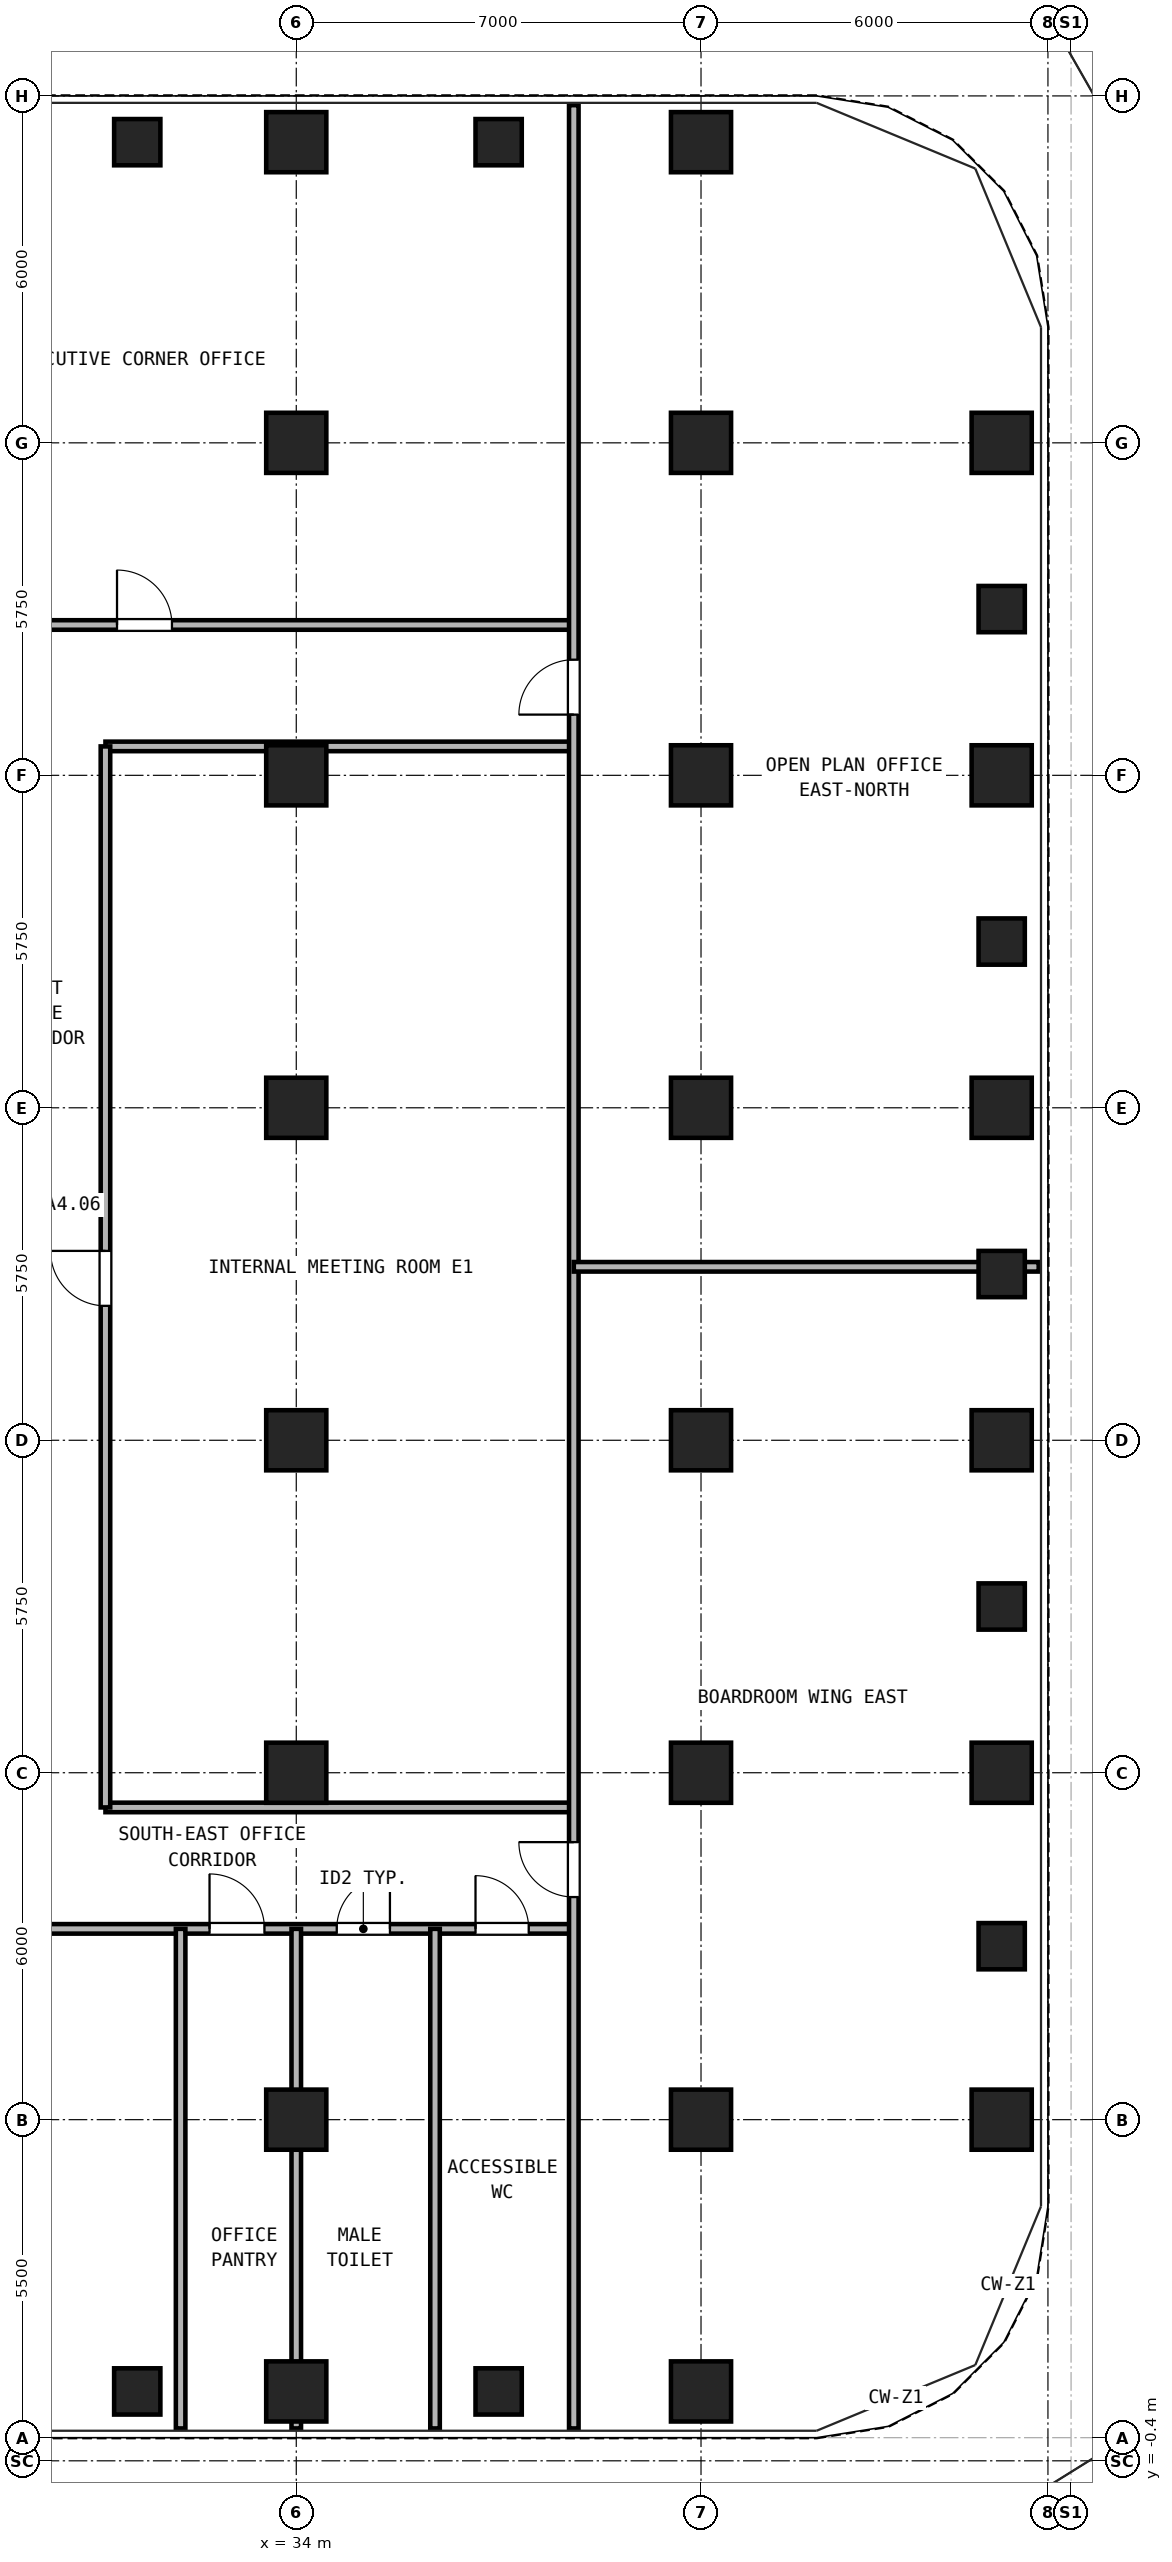
"""IFC4 building model, lengths in metres.
Left out: names, types, materials, properties, quantities, classifications, styles, units other than length and angle.
Written with IfcOpenShell. Run it as: python <this file> out.ifc"""

import sys

from ifc_helpers import new_model, si_unit, direction, frame, frame_2d, origin, origin_2d, place, context, subcontext, project, spatial, rectangle, hollow_rectangle, extrude, source, transform, mapped, element, fill, save


model = new_model("IFC4")
c1 = context("Model", 3, precision=1e-05, world=origin(), true_north=direction((0.0, 1.0)))
c2 = subcontext(c1, "Body", "Model", "MODEL_VIEW")
j1 = project(units=[si_unit("LENGTHUNIT", "METRE"), si_unit("PLANEANGLEUNIT", "RADIAN")], contexts=[c1])
p1 = place(None, origin())
s1 = spatial("IfcSite", under=j1, at=p1, CompositionType="ELEMENT")
p2 = place(p1, origin())
s2 = spatial("IfcBuilding", under=s1, at=p2, CompositionType="ELEMENT")
p3 = place(p2, frame((0.0, 0.0, 26.1)))
s3 = spatial("IfcBuildingStorey", under=s2, at=p3, CompositionType="ELEMENT", Elevation=26.1)
m1 = source(origin(), c2, "Body", "SweptSolid", [
    extrude(hollow_rectangle(XDim=1.04, YDim=1.04, WallThickness=0.065, at=origin_2d()), origin(), (0.0, 0.0, 1.0), 3.32),
])
for number, where, z_axis, x_axis in (
    (1, (34.0, 0.8, 0.0), (0.0, 0.0, 1.0), (1.0, 0.0, 0.0)),
    (2, (34.0, 39.7, 0.0), (0.0, 0.0, 1.0), (1.0, 0.0, 0.0)),
    (3, (41.0, 0.8, 0.0), (0.0, 0.0, 1.0), (1.0, 0.0, 0.0)),
    (4, (41.0, 39.7, 0.0), (0.0, 0.0, 1.0), (1.0, 0.0, 0.0)),
    (5, (46.2, 5.5, 0.0), (0.0, 0.0, 1.0), (1.0, 0.0, 0.0)),
    (6, (46.2, 11.5, 0.0), (0.0, 0.0, 1.0), (1.0, 0.0, 0.0)),
    (7, (46.2, 17.25, 0.0), (0.0, 0.0, 1.0), (1.0, 0.0, 0.0)),
    (8, (46.2, 23.0, 0.0), (0.0, 0.0, 1.0), (1.0, 0.0, 0.0)),
    (9, (46.2, 28.75, 0.0), (0.0, 0.0, 1.0), (1.0, 0.0, 0.0)),
    (10, (46.2, 34.5, 0.0), (0.0, 0.0, 1.0), (1.0, 0.0, 0.0)),
    (11, (34.0, 5.5, 0.0), (0.0, 0.0, 1.0), (1.0, 0.0, 0.0)),
    (12, (34.0, 11.5, 0.0), (0.0, 0.0, 1.0), (1.0, 0.0, 0.0)),
    (13, (34.0, 17.25, 0.0), (0.0, 0.0, 1.0), (1.0, 0.0, 0.0)),
    (14, (34.0, 23.0, 0.0), (0.0, 0.0, 1.0), (1.0, 0.0, 0.0)),
    (15, (34.0, 28.75, 0.0), (0.0, 0.0, 1.0), (1.0, 0.0, 0.0)),
    (16, (34.0, 34.5, 0.0), (0.0, 0.0, 1.0), (1.0, 0.0, 0.0)),
    (17, (41.0, 5.5, 0.0), (0.0, 0.0, 1.0), (1.0, 0.0, 0.0)),
    (18, (41.0, 11.5, 0.0), (0.0, 0.0, 1.0), (1.0, 0.0, 0.0)),
    (19, (41.0, 17.25, 0.0), (0.0, 0.0, 1.0), (1.0, 0.0, 0.0)),
    (20, (41.0, 23.0, 0.0), (0.0, 0.0, 1.0), (1.0, 0.0, 0.0)),
    (21, (41.0, 28.75, 0.0), (0.0, 0.0, 1.0), (1.0, 0.0, 0.0)),
    (22, (41.0, 34.5, 0.0), (0.0, 0.0, 1.0), (1.0, 0.0, 0.0)),
):
    element("IfcColumn", number, at=place(p3, frame(where, z_axis=z_axis, x_axis=x_axis)), inside=s3, PredefinedType="COLUMN", context=c2, shape_type="MappedRepresentation", body=[
        mapped(m1, transform((0.0, 0.0, 0.0), x_axis=(1.0, 0.0, 0.0), y_axis=(0.0, 1.0, 0.0), z_axis=(0.0, 0.0, 1.0), scale=1.0)),
    ])
m2 = source(origin(), c2, "Body", "SweptSolid", [
    extrude(hollow_rectangle(XDim=0.8, YDim=0.8, WallThickness=0.045, at=origin_2d()), origin(), (0.0, 0.0, 1.0), 3.32),
])
for number, where, z_axis, x_axis in (
    (23, (31.25, 0.8, 0.0), (0.0, 0.0, 1.0), (1.0, 0.0, 0.0)),
    (24, (31.25, 39.7, 0.0), (0.0, 0.0, 1.0), (1.0, 0.0, 0.0)),
    (25, (37.5, 0.8, 0.0), (0.0, 0.0, 1.0), (1.0, 0.0, 0.0)),
    (26, (37.5, 39.7, 0.0), (0.0, 0.0, 1.0), (1.0, 0.0, 0.0)),
    (27, (46.2, 8.5, 0.0), (0.0, 0.0, 1.0), (1.0, 0.0, 0.0)),
    (28, (46.2, 14.375, 0.0), (0.0, 0.0, 1.0), (1.0, 0.0, 0.0)),
    (29, (46.2, 20.125, 0.0), (0.0, 0.0, 1.0), (1.0, 0.0, 0.0)),
    (30, (46.2, 25.875, 0.0), (0.0, 0.0, 1.0), (1.0, 0.0, 0.0)),
    (31, (46.2, 31.625, 0.0), (0.0, 0.0, 1.0), (1.0, 0.0, 0.0)),
):
    element("IfcColumn", number, at=place(p3, frame(where, z_axis=z_axis, x_axis=x_axis)), inside=s3, PredefinedType="COLUMN", context=c2, shape_type="MappedRepresentation", body=[
        mapped(m2, transform((0.0, 0.0, 0.0), x_axis=(1.0, 0.0, 0.0), y_axis=(0.0, 1.0, 0.0), z_axis=(0.0, 0.0, 1.0), scale=1.0)),
    ])
p4 = place(p3, frame((8.2, 8.8, 0.0), z_axis=(0.0, 0.0, 1.0), x_axis=(1.0, 0.0, 0.0)))
e32 = element("IfcWall", 32, at=p4, inside=s3, PredefinedType="PARTITIONING", context=c2, shape_type="SweptSolid", body=[
    extrude(rectangle(XDim=30.6, YDim=0.165, at=frame_2d((15.3, 0.0))), origin(), (0.0, 0.0, 1.0), 3.32),
])
p5 = place(p4, frame((7.15, 0.0, 0.0)))
e33 = element("IfcOpeningElement", 33, at=p5, cuts=e32, PredefinedType="OPENING", context=c2, shape_type="SweptSolid", body=[
    extrude(rectangle(XDim=0.95, YDim=2.15, at=frame_2d((0.475, 1.075))), frame((0.0, 0.093, 0.0), z_axis=(0.0, -1.0, 0.0), x_axis=(1.0, 0.0, 0.0)), (0.0, 0.0, 1.0), 0.185),
])
p6 = place(p4, frame((19.05, 0.0, 0.0)))
e34 = element("IfcOpeningElement", 34, at=p6, cuts=e32, PredefinedType="OPENING", context=c2, shape_type="SweptSolid", body=[
    extrude(rectangle(XDim=0.95, YDim=2.15, at=frame_2d((0.475, 1.075))), frame((0.0, 0.093, 0.0), z_axis=(0.0, -1.0, 0.0), x_axis=(1.0, 0.0, 0.0)), (0.0, 0.0, 1.0), 0.185),
])
p7 = place(p4, frame((24.3, 0.0, 0.0)))
e35 = element("IfcOpeningElement", 35, at=p7, cuts=e32, PredefinedType="OPENING", context=c2, shape_type="SweptSolid", body=[
    extrude(rectangle(XDim=0.95, YDim=2.15, at=frame_2d((0.475, 1.075))), frame((0.0, 0.093, 0.0), z_axis=(0.0, -1.0, 0.0), x_axis=(1.0, 0.0, 0.0)), (0.0, 0.0, 1.0), 0.185),
])
p8 = place(p4, frame((26.5, 0.0, 0.0)))
e36 = element("IfcOpeningElement", 36, at=p8, cuts=e32, PredefinedType="OPENING", context=c2, shape_type="SweptSolid", body=[
    extrude(rectangle(XDim=0.92, YDim=2.1, at=frame_2d((0.46, 1.05))), frame((0.0, 0.093, 0.0), z_axis=(0.0, -1.0, 0.0), x_axis=(1.0, 0.0, 0.0)), (0.0, 0.0, 1.0), 0.185),
])
p9 = place(p4, frame((28.9, 0.0, 0.0)))
e37 = element("IfcOpeningElement", 37, at=p9, cuts=e32, PredefinedType="OPENING", context=c2, shape_type="SweptSolid", body=[
    extrude(rectangle(XDim=0.92, YDim=2.1, at=frame_2d((0.46, 1.05))), frame((0.0, 0.093, 0.0), z_axis=(0.0, -1.0, 0.0), x_axis=(1.0, 0.0, 0.0)), (0.0, 0.0, 1.0), 0.185),
])
p10 = place(p3, frame((8.2, 31.35, 0.0), z_axis=(0.0, 0.0, 1.0), x_axis=(1.0, 0.0, 0.0)))
e38 = element("IfcWall", 38, at=p10, inside=s3, PredefinedType="PARTITIONING", context=c2, shape_type="SweptSolid", body=[
    extrude(rectangle(XDim=30.6, YDim=0.165, at=frame_2d((15.3, 0.0))), origin(), (0.0, 0.0, 1.0), 3.32),
])
p11 = place(p10, frame((7.4, 0.0, 0.0)))
e39 = element("IfcOpeningElement", 39, at=p11, cuts=e38, PredefinedType="OPENING", context=c2, shape_type="SweptSolid", body=[
    extrude(rectangle(XDim=0.95, YDim=2.15, at=frame_2d((0.475, 1.075))), frame((0.0, 0.093, 0.0), z_axis=(0.0, -1.0, 0.0), x_axis=(1.0, 0.0, 0.0)), (0.0, 0.0, 1.0), 0.185),
])
p12 = place(p10, frame((22.7, 0.0, 0.0)))
e40 = element("IfcOpeningElement", 40, at=p12, cuts=e38, PredefinedType="OPENING", context=c2, shape_type="SweptSolid", body=[
    extrude(rectangle(XDim=0.95, YDim=2.15, at=frame_2d((0.475, 1.075))), frame((0.0, 0.093, 0.0), z_axis=(0.0, -1.0, 0.0), x_axis=(1.0, 0.0, 0.0)), (0.0, 0.0, 1.0), 0.185),
])
for number, where, z_axis, x_axis in (
    (41, (30.7, 10.9, 0.0), (0.0, 0.0, 1.0), (1.0, 0.0, 0.0)),
    (42, (30.7, 29.25, 0.0), (0.0, 0.0, 1.0), (1.0, 0.0, 0.0)),
):
    element("IfcWall", number, at=place(p3, frame(where, z_axis=z_axis, x_axis=x_axis)), inside=s3, PredefinedType="PARTITIONING", context=c2, shape_type="SweptSolid", body=[
        extrude(rectangle(XDim=8.1, YDim=0.165, at=frame_2d((4.05, 0.0))), origin(), (0.0, 0.0, 1.0), 3.32),
    ])
p13 = place(p3, frame((30.7, 10.9, 0.0), z_axis=(0.0, 0.0, 1.0), x_axis=(0.0, 1.0, 0.0)))
e43 = element("IfcWall", 43, at=p13, inside=s3, PredefinedType="PARTITIONING", context=c2, shape_type="SweptSolid", body=[
    extrude(rectangle(XDim=18.35, YDim=0.165, at=frame_2d((9.175, 0.0))), origin(), (0.0, 0.0, 1.0), 3.32),
])
p14 = place(p13, frame((8.675, 0.0, 0.0)))
e44 = element("IfcOpeningElement", 44, at=p14, cuts=e43, PredefinedType="OPENING", context=c2, shape_type="SweptSolid", body=[
    extrude(rectangle(XDim=0.95, YDim=2.15, at=frame_2d((0.475, 1.075))), frame((0.0, 0.093, 0.0), z_axis=(0.0, -1.0, 0.0), x_axis=(1.0, 0.0, 0.0)), (0.0, 0.0, 1.0), 0.185),
])
p15 = place(p3, frame((38.8, 0.16, 0.0), z_axis=(0.0, 0.0, 1.0), x_axis=(0.0, 1.0, 0.0)))
e45 = element("IfcWall", 45, at=p15, inside=s3, PredefinedType="PARTITIONING", context=c2, shape_type="SweptSolid", body=[
    extrude(rectangle(XDim=40.18, YDim=0.165, at=frame_2d((20.09, 0.0))), origin(), (0.0, 0.0, 1.0), 3.32),
])
p16 = place(p15, frame((9.19, 0.0, 0.0)))
e46 = element("IfcOpeningElement", 46, at=p16, cuts=e45, PredefinedType="OPENING", context=c2, shape_type="SweptSolid", body=[
    extrude(rectangle(XDim=0.95, YDim=2.15, at=frame_2d((0.475, 1.075))), frame((0.0, 0.093, 0.0), z_axis=(0.0, -1.0, 0.0), x_axis=(1.0, 0.0, 0.0)), (0.0, 0.0, 1.0), 0.185),
])
p17 = place(p15, frame((29.64, 0.0, 0.0)))
e47 = element("IfcOpeningElement", 47, at=p17, cuts=e45, PredefinedType="OPENING", context=c2, shape_type="SweptSolid", body=[
    extrude(rectangle(XDim=0.95, YDim=2.15, at=frame_2d((0.475, 1.075))), frame((0.0, 0.093, 0.0), z_axis=(0.0, -1.0, 0.0), x_axis=(1.0, 0.0, 0.0)), (0.0, 0.0, 1.0), 0.185),
])
p18 = place(p3, frame((32.0, 0.16, 0.0), z_axis=(0.0, 0.0, 1.0), x_axis=(0.0, 1.0, 0.0)))
e48 = element("IfcWall", 48, at=p18, inside=s3, PredefinedType="PARTITIONING", context=c2, shape_type="SweptSolid", body=[
    extrude(rectangle(XDim=8.64, YDim=0.165, at=frame_2d((4.32, 0.0))), origin(), (0.0, 0.0, 1.0), 3.32),
])
p19 = place(p3, frame((34.0, 0.16, 0.0), z_axis=(0.0, 0.0, 1.0), x_axis=(0.0, 1.0, 0.0)))
e49 = element("IfcWall", 49, at=p19, inside=s3, PredefinedType="PARTITIONING", context=c2, shape_type="SweptSolid", body=[
    extrude(rectangle(XDim=8.64, YDim=0.165, at=frame_2d((4.32, 0.0))), origin(), (0.0, 0.0, 1.0), 2.539),
])
p20 = place(p3, frame((36.4, 0.16, 0.0), z_axis=(0.0, 0.0, 1.0), x_axis=(0.0, 1.0, 0.0)))
e50 = element("IfcWall", 50, at=p20, inside=s3, PredefinedType="PARTITIONING", context=c2, shape_type="SweptSolid", body=[
    extrude(rectangle(XDim=8.64, YDim=0.165, at=frame_2d((4.32, 0.0))), origin(), (0.0, 0.0, 1.0), 3.32),
])
p21 = place(p3, frame((38.8, 20.25, 0.0), z_axis=(0.0, 0.0, 1.0), x_axis=(1.0, 0.0, 0.0)))
e51 = element("IfcWall", 51, at=p21, inside=s3, PredefinedType="PARTITIONING", context=c2, shape_type="SweptSolid", body=[
    extrude(rectangle(XDim=8.04, YDim=0.165, at=frame_2d((4.02, 0.0))), origin(), (0.0, 0.0, 1.0), 2.898),
])
p22 = place(p7, frame((0.95, 0.0, 0.0), z_axis=(0.0, 0.0, 1.0), x_axis=(-1.0, 0.0, 0.0)))
e52 = element("IfcDoor", 52, at=p22, inside=s3, OperationType="SINGLE_SWING_LEFT", PredefinedType="DOOR", context=c2, shape_type="SweptSolid", body=[
    extrude(rectangle(XDim=0.95, YDim=2.15, at=frame_2d((0.475, 1.075))), frame((0.0, 0.025, 0.0), z_axis=(0.0, -1.0, 0.0), x_axis=(1.0, 0.0, 0.0)), (0.0, 0.0, 1.0), 0.05),
])
fill(e35, e52)
p23 = place(p8, frame((0.92, 0.0, 0.0), z_axis=(0.0, 0.0, 1.0), x_axis=(-1.0, 0.0, 0.0)))
e53 = element("IfcDoor", 53, at=p23, inside=s3, OperationType="SINGLE_SWING_RIGHT", PredefinedType="DOOR", context=c2, shape_type="SweptSolid", body=[
    extrude(rectangle(XDim=0.92, YDim=2.1, at=frame_2d((0.46, 1.05))), frame((0.0, 0.025, 0.0), z_axis=(0.0, -1.0, 0.0), x_axis=(1.0, 0.0, 0.0)), (0.0, 0.0, 1.0), 0.05),
])
fill(e36, e53)
p24 = place(p9, frame((0.92, 0.0, 0.0), z_axis=(0.0, 0.0, 1.0), x_axis=(-1.0, 0.0, 0.0)))
e54 = element("IfcDoor", 54, at=p24, inside=s3, OperationType="SINGLE_SWING_LEFT", PredefinedType="DOOR", context=c2, shape_type="SweptSolid", body=[
    extrude(rectangle(XDim=0.92, YDim=2.1, at=frame_2d((0.46, 1.05))), frame((0.0, 0.025, 0.0), z_axis=(0.0, -1.0, 0.0), x_axis=(1.0, 0.0, 0.0)), (0.0, 0.0, 1.0), 0.05),
])
fill(e37, e54)
p25 = place(p12, origin())
e55 = element("IfcDoor", 55, at=p25, inside=s3, OperationType="SINGLE_SWING_LEFT", PredefinedType="DOOR", context=c2, shape_type="SweptSolid", body=[
    extrude(rectangle(XDim=0.95, YDim=2.15, at=frame_2d((0.475, 1.075))), frame((0.0, 0.025, 0.0), z_axis=(0.0, -1.0, 0.0), x_axis=(1.0, 0.0, 0.0)), (0.0, 0.0, 1.0), 0.05),
])
fill(e40, e55)
p26 = place(p16, origin())
e56 = element("IfcDoor", 56, at=p26, inside=s3, OperationType="SINGLE_SWING_RIGHT", PredefinedType="DOOR", context=c2, shape_type="SweptSolid", body=[
    extrude(rectangle(XDim=0.95, YDim=2.15, at=frame_2d((0.475, 1.075))), frame((0.0, 0.025, 0.0), z_axis=(0.0, -1.0, 0.0), x_axis=(1.0, 0.0, 0.0)), (0.0, 0.0, 1.0), 0.05),
])
fill(e46, e56)
p27 = place(p17, origin())
e57 = element("IfcDoor", 57, at=p27, inside=s3, OperationType="SINGLE_SWING_LEFT", PredefinedType="DOOR", context=c2, shape_type="SweptSolid", body=[
    extrude(rectangle(XDim=0.95, YDim=2.15, at=frame_2d((0.475, 1.075))), frame((0.0, 0.025, 0.0), z_axis=(0.0, -1.0, 0.0), x_axis=(1.0, 0.0, 0.0)), (0.0, 0.0, 1.0), 0.05),
])
fill(e47, e57)
p28 = place(p14, origin())
e58 = element("IfcDoor", 58, at=p28, inside=s3, OperationType="SINGLE_SWING_RIGHT", PredefinedType="DOOR", context=c2, shape_type="SweptSolid", body=[
    extrude(rectangle(XDim=0.95, YDim=2.15, at=frame_2d((0.475, 1.075))), frame((0.0, 0.025, 0.0), z_axis=(0.0, -1.0, 0.0), x_axis=(1.0, 0.0, 0.0)), (0.0, 0.0, 1.0), 0.05),
])
fill(e44, e58)
save(model, sys.argv[1])
